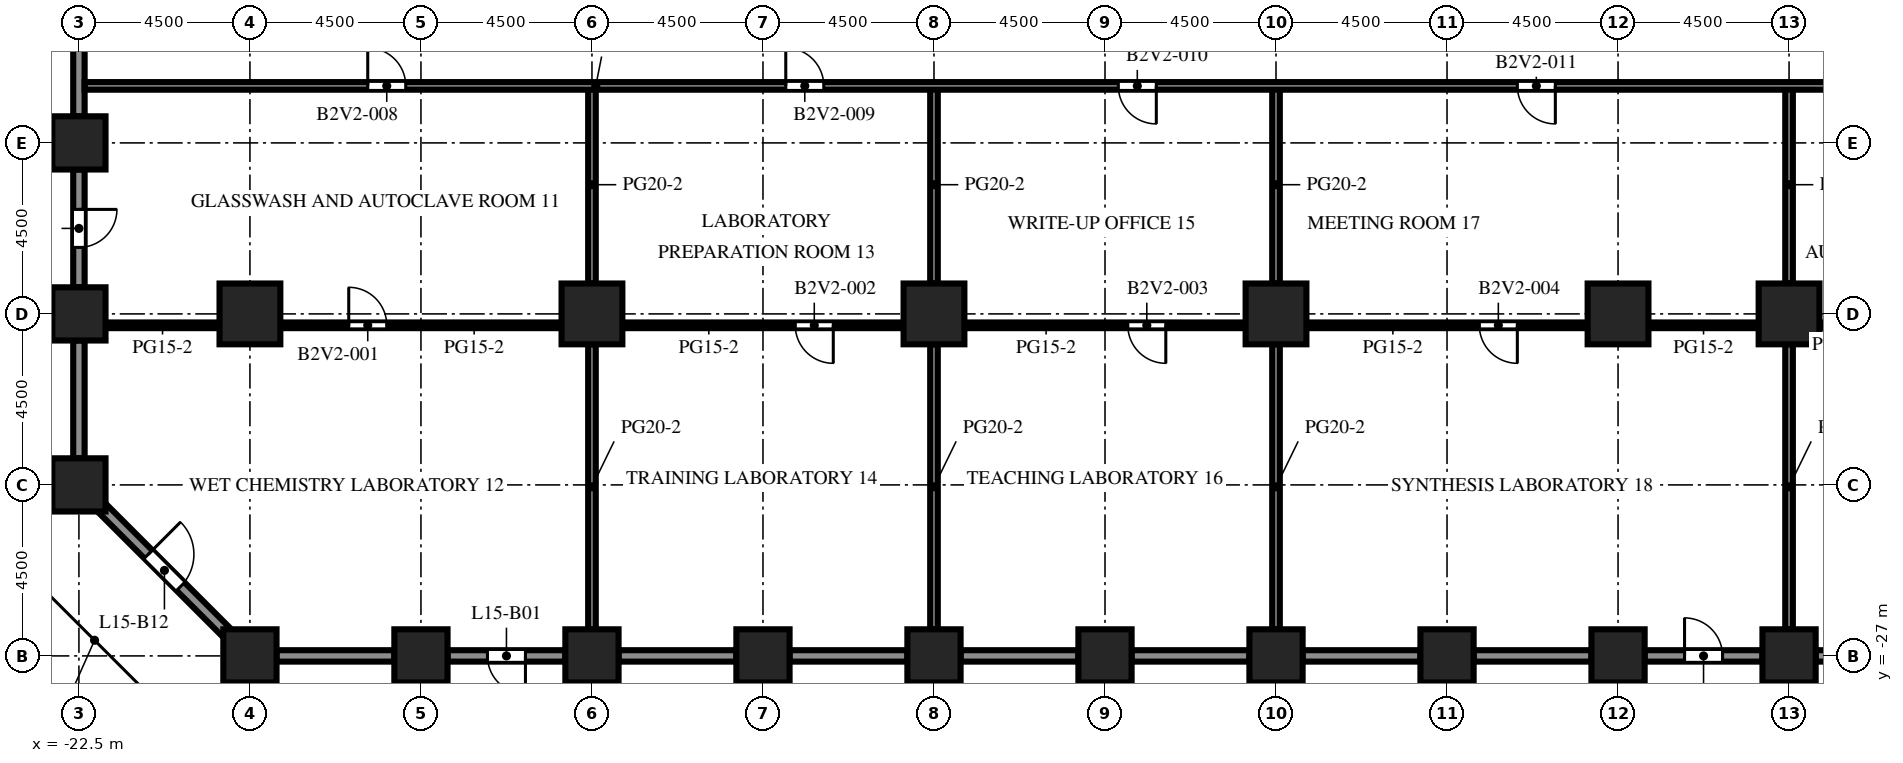
"""IFC4 building model, lengths in metres.
Left out: names, types, materials, properties, quantities, classifications, styles, units other than length and angle.
Written with IfcOpenShell. Run it as: python <this file> out.ifc"""

import sys

from ifc_helpers import new_model, si_unit, direction, frame, frame_2d, origin, origin_2d, place, context, subcontext, project, spatial, rectangle, extrude, element, fill, save


model = new_model("IFC4")
c1 = context("Model", 3, precision=1e-05, world=origin(), true_north=direction((0.0, 1.0)))
c2 = subcontext(c1, "Body", "Model", "MODEL_VIEW")
j1 = project(units=[si_unit("LENGTHUNIT", "METRE"), si_unit("PLANEANGLEUNIT", "RADIAN")], contexts=[c1])
p1 = place(None, origin())
s1 = spatial("IfcSite", under=j1, at=p1, CompositionType="ELEMENT")
p2 = place(p1, origin())
s2 = spatial("IfcBuilding", under=s1, at=p2, CompositionType="ELEMENT")
p3 = place(p2, frame((0.0, 0.0, 66.5)))
s3 = spatial("IfcBuildingStorey", under=s2, at=p3, CompositionType="ELEMENT", Elevation=66.5)
for number, where, z_axis, x_axis in (
    (1, (-22.5, -22.5, 0.0), (0.0, 0.0, 1.0), (1.0, 0.0, 0.0)),
    (2, (-22.5, -18.0, 0.0), (0.0, 0.0, 1.0), (1.0, 0.0, 0.0)),
    (3, (-22.5, -13.5, 0.0), (0.0, 0.0, 1.0), (1.0, 0.0, 0.0)),
    (4, (-18.0, -27.0, 0.0), (0.0, 0.0, 1.0), (1.0, 0.0, 0.0)),
    (5, (-13.5, -27.0, 0.0), (0.0, 0.0, 1.0), (1.0, 0.0, 0.0)),
    (6, (-9.0, -27.0, 0.0), (0.0, 0.0, 1.0), (1.0, 0.0, 0.0)),
    (7, (-4.5, -27.0, 0.0), (0.0, 0.0, 1.0), (1.0, 0.0, 0.0)),
    (8, (0.0, -27.0, 0.0), (0.0, 0.0, 1.0), (1.0, 0.0, 0.0)),
    (9, (4.5, -27.0, 0.0), (0.0, 0.0, 1.0), (1.0, 0.0, 0.0)),
    (10, (9.0, -27.0, 0.0), (0.0, 0.0, 1.0), (1.0, 0.0, 0.0)),
    (11, (13.5, -27.0, 0.0), (0.0, 0.0, 1.0), (1.0, 0.0, 0.0)),
    (12, (18.0, -27.0, 0.0), (0.0, 0.0, 1.0), (1.0, 0.0, 0.0)),
    (13, (22.5, -27.0, 0.0), (0.0, 0.0, 1.0), (1.0, 0.0, 0.0)),
):
    element("IfcColumn", number, at=place(p3, frame(where, z_axis=z_axis, x_axis=x_axis)), inside=s3, PredefinedType="COLUMN", context=c2, shape_type="SweptSolid", body=[
        extrude(rectangle(XDim=1.4, YDim=1.4, at=origin_2d()), origin(), (0.0, 0.0, 1.0), 4.1),
    ])
for number, where, z_axis, x_axis in (
    (14, (-18.0, -18.0, 0.0), (0.0, 0.0, 1.0), (1.0, 0.0, 0.0)),
    (15, (-9.0, -18.0, 0.0), (0.0, 0.0, 1.0), (1.0, 0.0, 0.0)),
    (16, (0.0, -18.0, 0.0), (0.0, 0.0, 1.0), (1.0, 0.0, 0.0)),
    (17, (9.0, -18.0, 0.0), (0.0, 0.0, 1.0), (1.0, 0.0, 0.0)),
    (18, (18.0, -18.0, 0.0), (0.0, 0.0, 1.0), (1.0, 0.0, 0.0)),
    (19, (22.5, -18.0, 0.0), (0.0, 0.0, 1.0), (1.0, 0.0, 0.0)),
):
    element("IfcColumn", number, at=place(p3, frame(where, z_axis=z_axis, x_axis=x_axis)), inside=s3, PredefinedType="COLUMN", context=c2, shape_type="SweptSolid", body=[
        extrude(rectangle(XDim=1.6, YDim=1.6, at=origin_2d()), origin(), (0.0, 0.0, 1.0), 4.1),
    ])
p4 = place(p3, frame((-14.2, -27.0, 0.0), z_axis=(0.0, 0.0, 1.0), x_axis=(-1.0, 0.0, 0.0)))
e20 = element("IfcWall", 20, at=p4, inside=s3, PredefinedType="SOLIDWALL", context=c2, shape_type="SweptSolid", body=[
    extrude(rectangle(XDim=3.1, YDim=0.3, at=frame_2d((1.55, 0.0))), origin(), (0.0, 0.0, 1.0), 2.6),
])
p5 = place(p3, frame((-9.7, -27.0, 0.0), z_axis=(0.0, 0.0, 1.0), x_axis=(-1.0, 0.0, 0.0)))
e21 = element("IfcWall", 21, at=p5, inside=s3, PredefinedType="SOLIDWALL", context=c2, shape_type="SweptSolid", body=[
    extrude(rectangle(XDim=3.1, YDim=0.3, at=frame_2d((1.55, 0.0))), origin(), (0.0, 0.0, 1.0), 2.6),
])
p6 = place(p5, frame((1.05, 0.0, 0.0)))
e22 = element("IfcOpeningElement", 22, at=p6, cuts=e21, PredefinedType="OPENING", context=c2, shape_type="SweptSolid", body=[
    extrude(rectangle(XDim=1.0, YDim=2.2, at=frame_2d((0.5, 1.1))), frame((0.0, 0.16, 0.0), z_axis=(0.0, -1.0, 0.0), x_axis=(1.0, 0.0, 0.0)), (0.0, 0.0, 1.0), 0.32),
])
for number, where, z_axis, x_axis in (
    (23, (-5.2, -27.0, 0.0), (0.0, 0.0, 1.0), (-1.0, 0.0, 0.0)),
    (24, (-0.7, -27.0, 0.0), (0.0, 0.0, 1.0), (-1.0, 0.0, 0.0)),
    (25, (3.8, -27.0, 0.0), (0.0, 0.0, 1.0), (-1.0, 0.0, 0.0)),
    (26, (8.3, -27.0, 0.0), (0.0, 0.0, 1.0), (-1.0, 0.0, 0.0)),
    (27, (12.8, -27.0, 0.0), (0.0, 0.0, 1.0), (-1.0, 0.0, 0.0)),
    (28, (17.3, -27.0, 0.0), (0.0, 0.0, 1.0), (-1.0, 0.0, 0.0)),
):
    element("IfcWall", number, at=place(p3, frame(where, z_axis=z_axis, x_axis=x_axis)), inside=s3, PredefinedType="SOLIDWALL", context=c2, shape_type="SweptSolid", body=[
        extrude(rectangle(XDim=3.1, YDim=0.3, at=frame_2d((1.55, 0.0))), origin(), (0.0, 0.0, 1.0), 2.6),
    ])
p7 = place(p3, frame((21.8, -27.0, 0.0), z_axis=(0.0, 0.0, 1.0), x_axis=(-1.0, 0.0, 0.0)))
e29 = element("IfcWall", 29, at=p7, inside=s3, PredefinedType="SOLIDWALL", context=c2, shape_type="SweptSolid", body=[
    extrude(rectangle(XDim=3.1, YDim=0.3, at=frame_2d((1.55, 0.0))), origin(), (0.0, 0.0, 1.0), 2.6),
])
p8 = place(p7, frame((1.05, 0.0, 0.0)))
e30 = element("IfcOpeningElement", 30, at=p8, cuts=e29, PredefinedType="OPENING", context=c2, shape_type="SweptSolid", body=[
    extrude(rectangle(XDim=1.0, YDim=2.2, at=frame_2d((0.5, 1.1))), frame((0.0, 0.16, 0.0), z_axis=(0.0, -1.0, 0.0), x_axis=(1.0, 0.0, 0.0)), (0.0, 0.0, 1.0), 0.32),
])
for number, where, z_axis, x_axis in (
    (31, (26.3, -27.0, 0.0), (0.0, 0.0, 1.0), (-1.0, 0.0, 0.0)),
    (32, (-22.5, -12.8, 0.0), (0.0, 0.0, 1.0), (0.0, 1.0, 0.0)),
):
    element("IfcWall", number, at=place(p3, frame(where, z_axis=z_axis, x_axis=x_axis)), inside=s3, PredefinedType="SOLIDWALL", context=c2, shape_type="SweptSolid", body=[
        extrude(rectangle(XDim=3.1, YDim=0.3, at=frame_2d((1.55, 0.0))), origin(), (0.0, 0.0, 1.0), 2.6),
    ])
p9 = place(p3, frame((-22.5, -17.3, 0.0), z_axis=(0.0, 0.0, 1.0), x_axis=(0.0, 1.0, 0.0)))
e33 = element("IfcWall", 33, at=p9, inside=s3, PredefinedType="SOLIDWALL", context=c2, shape_type="SweptSolid", body=[
    extrude(rectangle(XDim=3.1, YDim=0.3, at=frame_2d((1.55, 0.0))), origin(), (0.0, 0.0, 1.0), 2.6),
])
p10 = place(p9, frame((1.05, 0.0, 0.0)))
e34 = element("IfcOpeningElement", 34, at=p10, cuts=e33, PredefinedType="OPENING", context=c2, shape_type="SweptSolid", body=[
    extrude(rectangle(XDim=1.0, YDim=2.2, at=frame_2d((0.5, 1.1))), frame((0.0, 0.16, 0.0), z_axis=(0.0, -1.0, 0.0), x_axis=(1.0, 0.0, 0.0)), (0.0, 0.0, 1.0), 0.32),
])
p11 = place(p3, frame((-22.5, -21.8, 0.0), z_axis=(0.0, 0.0, 1.0), x_axis=(0.0, 1.0, 0.0)))
e35 = element("IfcWall", 35, at=p11, inside=s3, PredefinedType="SOLIDWALL", context=c2, shape_type="SweptSolid", body=[
    extrude(rectangle(XDim=3.1, YDim=0.3, at=frame_2d((1.55, 0.0))), origin(), (0.0, 0.0, 1.0), 2.6),
])
p12 = place(p3, frame((-18.594, -26.406, 0.0), z_axis=(0.0, 0.0, 1.0), x_axis=(-0.707106781187, 0.707106781187, 0.0)))
e36 = element("IfcWall", 36, at=p12, inside=s3, PredefinedType="SOLIDWALL", context=c2, shape_type="SweptSolid", body=[
    extrude(rectangle(XDim=4.684, YDim=0.3, at=frame_2d((2.342, 0.0))), origin(), (0.0, 0.0, 1.0), 2.6),
])
p13 = place(p12, frame((1.742, 0.0, 0.0)))
e37 = element("IfcOpeningElement", 37, at=p13, cuts=e36, PredefinedType="OPENING", context=c2, shape_type="SweptSolid", body=[
    extrude(rectangle(XDim=1.2, YDim=2.2, at=frame_2d((0.6, 1.1))), frame((0.0, 0.16, 0.0), z_axis=(0.0, -1.0, 0.0), x_axis=(1.0, 0.0, 0.0)), (0.0, 0.0, 1.0), 0.32),
])
p14 = place(p3, frame((-9.0, -26.3, 0.0), z_axis=(0.0, 0.0, 1.0), x_axis=(0.0, 1.0, 0.0)))
e38 = element("IfcWall", 38, at=p14, inside=s3, PredefinedType="PARTITIONING", context=c2, shape_type="SweptSolid", body=[
    extrude(rectangle(XDim=7.5, YDim=0.2, at=frame_2d((3.75, 0.0))), origin(), (0.0, 0.0, 1.0), 3.5),
])
p15 = place(p3, frame((-9.0, -17.2, 0.0), z_axis=(0.0, 0.0, 1.0), x_axis=(0.0, 1.0, 0.0)))
e39 = element("IfcWall", 39, at=p15, inside=s3, PredefinedType="PARTITIONING", context=c2, shape_type="SweptSolid", body=[
    extrude(rectangle(XDim=5.2, YDim=0.2, at=frame_2d((2.6, 0.0))), origin(), (0.0, 0.0, 1.0), 3.5),
])
p16 = place(p3, frame((0.0, -26.3, 0.0), z_axis=(0.0, 0.0, 1.0), x_axis=(0.0, 1.0, 0.0)))
e40 = element("IfcWall", 40, at=p16, inside=s3, PredefinedType="PARTITIONING", context=c2, shape_type="SweptSolid", body=[
    extrude(rectangle(XDim=7.5, YDim=0.2, at=frame_2d((3.75, 0.0))), origin(), (0.0, 0.0, 1.0), 3.5),
])
p17 = place(p3, frame((0.0, -17.2, 0.0), z_axis=(0.0, 0.0, 1.0), x_axis=(0.0, 1.0, 0.0)))
e41 = element("IfcWall", 41, at=p17, inside=s3, PredefinedType="PARTITIONING", context=c2, shape_type="SweptSolid", body=[
    extrude(rectangle(XDim=5.2, YDim=0.2, at=frame_2d((2.6, 0.0))), origin(), (0.0, 0.0, 1.0), 3.5),
])
p18 = place(p3, frame((9.0, -26.3, 0.0), z_axis=(0.0, 0.0, 1.0), x_axis=(0.0, 1.0, 0.0)))
e42 = element("IfcWall", 42, at=p18, inside=s3, PredefinedType="PARTITIONING", context=c2, shape_type="SweptSolid", body=[
    extrude(rectangle(XDim=7.5, YDim=0.2, at=frame_2d((3.75, 0.0))), origin(), (0.0, 0.0, 1.0), 3.5),
])
p19 = place(p3, frame((9.0, -17.2, 0.0), z_axis=(0.0, 0.0, 1.0), x_axis=(0.0, 1.0, 0.0)))
e43 = element("IfcWall", 43, at=p19, inside=s3, PredefinedType="PARTITIONING", context=c2, shape_type="SweptSolid", body=[
    extrude(rectangle(XDim=5.2, YDim=0.2, at=frame_2d((2.6, 0.0))), origin(), (0.0, 0.0, 1.0), 3.5),
])
p20 = place(p3, frame((22.5, -26.3, 0.0), z_axis=(0.0, 0.0, 1.0), x_axis=(0.0, 1.0, 0.0)))
e44 = element("IfcWall", 44, at=p20, inside=s3, PredefinedType="PARTITIONING", context=c2, shape_type="SweptSolid", body=[
    extrude(rectangle(XDim=7.5, YDim=0.2, at=frame_2d((3.75, 0.0))), origin(), (0.0, 0.0, 1.0), 3.5),
])
p21 = place(p3, frame((22.5, -17.2, 0.0), z_axis=(0.0, 0.0, 1.0), x_axis=(0.0, 1.0, 0.0)))
e45 = element("IfcWall", 45, at=p21, inside=s3, PredefinedType="PARTITIONING", context=c2, shape_type="SweptSolid", body=[
    extrude(rectangle(XDim=5.2, YDim=0.2, at=frame_2d((2.6, 0.0))), origin(), (0.0, 0.0, 1.0), 3.5),
])
p22 = place(p3, frame((-21.8, -18.3, 0.0), z_axis=(0.0, 0.0, 1.0), x_axis=(1.0, 0.0, 0.0)))
e46 = element("IfcWall", 46, at=p22, inside=s3, PredefinedType="PARTITIONING", context=c2, shape_type="SweptSolid", body=[
    extrude(rectangle(XDim=3.0, YDim=0.15, at=frame_2d((1.5, 0.0))), origin(), (0.0, 0.0, 1.0), 3.5),
])
p23 = place(p3, frame((-9.8, -18.3, 0.0), z_axis=(0.0, 0.0, 1.0), x_axis=(-1.0, 0.0, 0.0)))
e47 = element("IfcWall", 47, at=p23, inside=s3, PredefinedType="PARTITIONING", context=c2, shape_type="SweptSolid", body=[
    extrude(rectangle(XDim=7.4, YDim=0.15, at=frame_2d((3.7, 0.0))), origin(), (0.0, 0.0, 1.0), 3.5),
])
p24 = place(p23, frame((4.6, 0.0, 0.0)))
e48 = element("IfcOpeningElement", 48, at=p24, cuts=e47, PredefinedType="OPENING", context=c2, shape_type="SweptSolid", body=[
    extrude(rectangle(XDim=1.0, YDim=2.1, at=frame_2d((0.5, 1.05))), frame((0.0, 0.085, 0.0), z_axis=(0.0, -1.0, 0.0), x_axis=(1.0, 0.0, 0.0)), (0.0, 0.0, 1.0), 0.17),
])
p25 = place(p3, frame((-0.8, -18.3, 0.0), z_axis=(0.0, 0.0, 1.0), x_axis=(-1.0, 0.0, 0.0)))
e49 = element("IfcWall", 49, at=p25, inside=s3, PredefinedType="PARTITIONING", context=c2, shape_type="SweptSolid", body=[
    extrude(rectangle(XDim=7.4, YDim=0.15, at=frame_2d((3.7, 0.0))), origin(), (0.0, 0.0, 1.0), 3.5),
])
p26 = place(p25, frame((1.85, 0.0, 0.0)))
e50 = element("IfcOpeningElement", 50, at=p26, cuts=e49, PredefinedType="OPENING", context=c2, shape_type="SweptSolid", body=[
    extrude(rectangle(XDim=1.0, YDim=2.1, at=frame_2d((0.5, 1.05))), frame((0.0, 0.085, 0.0), z_axis=(0.0, -1.0, 0.0), x_axis=(1.0, 0.0, 0.0)), (0.0, 0.0, 1.0), 0.17),
])
p27 = place(p3, frame((8.2, -18.3, 0.0), z_axis=(0.0, 0.0, 1.0), x_axis=(-1.0, 0.0, 0.0)))
e51 = element("IfcWall", 51, at=p27, inside=s3, PredefinedType="PARTITIONING", context=c2, shape_type="SweptSolid", body=[
    extrude(rectangle(XDim=7.4, YDim=0.15, at=frame_2d((3.7, 0.0))), origin(), (0.0, 0.0, 1.0), 3.5),
])
p28 = place(p27, frame((2.1, 0.0, 0.0)))
e52 = element("IfcOpeningElement", 52, at=p28, cuts=e51, PredefinedType="OPENING", context=c2, shape_type="SweptSolid", body=[
    extrude(rectangle(XDim=1.0, YDim=2.1, at=frame_2d((0.5, 1.05))), frame((0.0, 0.085, 0.0), z_axis=(0.0, -1.0, 0.0), x_axis=(1.0, 0.0, 0.0)), (0.0, 0.0, 1.0), 0.17),
])
p29 = place(p3, frame((17.2, -18.3, 0.0), z_axis=(0.0, 0.0, 1.0), x_axis=(-1.0, 0.0, 0.0)))
e53 = element("IfcWall", 53, at=p29, inside=s3, PredefinedType="PARTITIONING", context=c2, shape_type="SweptSolid", body=[
    extrude(rectangle(XDim=7.4, YDim=0.15, at=frame_2d((3.7, 0.0))), origin(), (0.0, 0.0, 1.0), 3.5),
])
p30 = place(p29, frame((1.85, 0.0, 0.0)))
e54 = element("IfcOpeningElement", 54, at=p30, cuts=e53, PredefinedType="OPENING", context=c2, shape_type="SweptSolid", body=[
    extrude(rectangle(XDim=1.0, YDim=2.1, at=frame_2d((0.5, 1.05))), frame((0.0, 0.085, 0.0), z_axis=(0.0, -1.0, 0.0), x_axis=(1.0, 0.0, 0.0)), (0.0, 0.0, 1.0), 0.17),
])
p31 = place(p3, frame((18.8, -18.3, 0.0), z_axis=(0.0, 0.0, 1.0), x_axis=(1.0, 0.0, 0.0)))
e55 = element("IfcWall", 55, at=p31, inside=s3, PredefinedType="PARTITIONING", context=c2, shape_type="SweptSolid", body=[
    extrude(rectangle(XDim=2.9, YDim=0.15, at=frame_2d((1.45, 0.0))), origin(), (0.0, 0.0, 1.0), 3.5),
])
p32 = place(p3, frame((26.2, -18.3, 0.0), z_axis=(0.0, 0.0, 1.0), x_axis=(-1.0, 0.0, 0.0)))
e56 = element("IfcWall", 56, at=p32, inside=s3, PredefinedType="PARTITIONING", context=c2, shape_type="SweptSolid", body=[
    extrude(rectangle(XDim=2.9, YDim=0.15, at=frame_2d((1.45, 0.0))), origin(), (0.0, 0.0, 1.0), 3.5),
])
p33 = place(p32, frame((0.1, 0.0, 0.0)))
e57 = element("IfcOpeningElement", 57, at=p33, cuts=e56, PredefinedType="OPENING", context=c2, shape_type="SweptSolid", body=[
    extrude(rectangle(XDim=1.0, YDim=2.1, at=frame_2d((0.5, 1.05))), frame((0.0, 0.085, 0.0), z_axis=(0.0, -1.0, 0.0), x_axis=(1.0, 0.0, 0.0)), (0.0, 0.0, 1.0), 0.17),
])
p34 = place(p3, frame((31.35, -12.0, 0.0), z_axis=(0.0, 0.0, 1.0), x_axis=(-1.0, 0.0, 0.0)))
e58 = element("IfcWall", 58, at=p34, inside=s3, PredefinedType="PARTITIONING", context=c2, shape_type="SweptSolid", body=[
    extrude(rectangle(XDim=53.7, YDim=0.2, at=frame_2d((26.85, 0.0))), origin(), (0.0, 0.0, 1.0), 3.5),
])
p35 = place(p34, frame((45.25, 0.0, 0.0)))
e59 = element("IfcOpeningElement", 59, at=p35, cuts=e58, PredefinedType="OPENING", context=c2, shape_type="SweptSolid", body=[
    extrude(rectangle(XDim=1.0, YDim=2.1, at=frame_2d((0.5, 1.05))), frame((0.0, 0.11, 0.0), z_axis=(0.0, -1.0, 0.0), x_axis=(1.0, 0.0, 0.0)), (0.0, 0.0, 1.0), 0.22),
])
p36 = place(p34, frame((34.25, 0.0, 0.0)))
e60 = element("IfcOpeningElement", 60, at=p36, cuts=e58, PredefinedType="OPENING", context=c2, shape_type="SweptSolid", body=[
    extrude(rectangle(XDim=1.0, YDim=2.1, at=frame_2d((0.5, 1.05))), frame((0.0, 0.11, 0.0), z_axis=(0.0, -1.0, 0.0), x_axis=(1.0, 0.0, 0.0)), (0.0, 0.0, 1.0), 0.22),
])
p37 = place(p34, frame((25.5, 0.0, 0.0)))
e61 = element("IfcOpeningElement", 61, at=p37, cuts=e58, PredefinedType="OPENING", context=c2, shape_type="SweptSolid", body=[
    extrude(rectangle(XDim=1.0, YDim=2.1, at=frame_2d((0.5, 1.05))), frame((0.0, 0.11, 0.0), z_axis=(0.0, -1.0, 0.0), x_axis=(1.0, 0.0, 0.0)), (0.0, 0.0, 1.0), 0.22),
])
p38 = place(p34, frame((15.0, 0.0, 0.0)))
e62 = element("IfcOpeningElement", 62, at=p38, cuts=e58, PredefinedType="OPENING", context=c2, shape_type="SweptSolid", body=[
    extrude(rectangle(XDim=1.0, YDim=2.1, at=frame_2d((0.5, 1.05))), frame((0.0, 0.11, 0.0), z_axis=(0.0, -1.0, 0.0), x_axis=(1.0, 0.0, 0.0)), (0.0, 0.0, 1.0), 0.22),
])
p39 = place(p34, frame((5.0, 0.0, 0.0)))
e63 = element("IfcOpeningElement", 63, at=p39, cuts=e58, PredefinedType="OPENING", context=c2, shape_type="SweptSolid", body=[
    extrude(rectangle(XDim=1.0, YDim=2.1, at=frame_2d((0.5, 1.05))), frame((0.0, 0.11, 0.0), z_axis=(0.0, -1.0, 0.0), x_axis=(1.0, 0.0, 0.0)), (0.0, 0.0, 1.0), 0.22),
])
p40 = place(p6, origin())
e64 = element("IfcDoor", 64, at=p40, inside=s3, OperationType="SINGLE_SWING_LEFT", PredefinedType="DOOR", context=c2, shape_type="SweptSolid", body=[
    extrude(rectangle(XDim=1.0, YDim=2.2, at=frame_2d((0.5, 1.1))), frame((0.0, 0.025, 0.0), z_axis=(0.0, -1.0, 0.0), x_axis=(1.0, 0.0, 0.0)), (0.0, 0.0, 1.0), 0.05),
])
fill(e22, e64)
p41 = place(p8, origin())
e65 = element("IfcDoor", 65, at=p41, inside=s3, OperationType="SINGLE_SWING_RIGHT", PredefinedType="DOOR", context=c2, shape_type="SweptSolid", body=[
    extrude(rectangle(XDim=1.0, YDim=2.2, at=frame_2d((0.5, 1.1))), frame((0.0, 0.025, 0.0), z_axis=(0.0, -1.0, 0.0), x_axis=(1.0, 0.0, 0.0)), (0.0, 0.0, 1.0), 0.05),
])
fill(e30, e65)
p42 = place(p10, origin())
e66 = element("IfcDoor", 66, at=p42, inside=s3, OperationType="SINGLE_SWING_RIGHT", PredefinedType="DOOR", context=c2, shape_type="SweptSolid", body=[
    extrude(rectangle(XDim=1.0, YDim=2.2, at=frame_2d((0.5, 1.1))), frame((0.0, 0.025, 0.0), z_axis=(0.0, -1.0, 0.0), x_axis=(1.0, 0.0, 0.0)), (0.0, 0.0, 1.0), 0.05),
])
fill(e34, e66)
p43 = place(p13, origin())
e67 = element("IfcDoor", 67, at=p43, inside=s3, OperationType="SINGLE_SWING_RIGHT", PredefinedType="DOOR", context=c2, shape_type="SweptSolid", body=[
    extrude(rectangle(XDim=1.2, YDim=2.2, at=frame_2d((0.6, 1.1))), frame((0.0, 0.025, 0.0), z_axis=(0.0, -1.0, 0.0), x_axis=(1.0, 0.0, 0.0)), (0.0, 0.0, 1.0), 0.05),
])
fill(e37, e67)
p44 = place(p24, origin())
e68 = element("IfcDoor", 68, at=p44, inside=s3, OperationType="SINGLE_SWING_RIGHT", PredefinedType="DOOR", context=c2, shape_type="SweptSolid", body=[
    extrude(rectangle(XDim=1.0, YDim=2.1, at=frame_2d((0.5, 1.05))), frame((0.0, 0.025, 0.0), z_axis=(0.0, -1.0, 0.0), x_axis=(1.0, 0.0, 0.0)), (0.0, 0.0, 1.0), 0.05),
])
fill(e48, e68)
p45 = place(p26, origin())
e69 = element("IfcDoor", 69, at=p45, inside=s3, OperationType="SINGLE_SWING_LEFT", PredefinedType="DOOR", context=c2, shape_type="SweptSolid", body=[
    extrude(rectangle(XDim=1.0, YDim=2.1, at=frame_2d((0.5, 1.05))), frame((0.0, 0.025, 0.0), z_axis=(0.0, -1.0, 0.0), x_axis=(1.0, 0.0, 0.0)), (0.0, 0.0, 1.0), 0.05),
])
fill(e50, e69)
p46 = place(p28, origin())
e70 = element("IfcDoor", 70, at=p46, inside=s3, OperationType="SINGLE_SWING_LEFT", PredefinedType="DOOR", context=c2, shape_type="SweptSolid", body=[
    extrude(rectangle(XDim=1.0, YDim=2.1, at=frame_2d((0.5, 1.05))), frame((0.0, 0.025, 0.0), z_axis=(0.0, -1.0, 0.0), x_axis=(1.0, 0.0, 0.0)), (0.0, 0.0, 1.0), 0.05),
])
fill(e52, e70)
p47 = place(p30, origin())
e71 = element("IfcDoor", 71, at=p47, inside=s3, OperationType="SINGLE_SWING_LEFT", PredefinedType="DOOR", context=c2, shape_type="SweptSolid", body=[
    extrude(rectangle(XDim=1.0, YDim=2.1, at=frame_2d((0.5, 1.05))), frame((0.0, 0.025, 0.0), z_axis=(0.0, -1.0, 0.0), x_axis=(1.0, 0.0, 0.0)), (0.0, 0.0, 1.0), 0.05),
])
fill(e54, e71)
p48 = place(p35, origin())
e72 = element("IfcDoor", 72, at=p48, inside=s3, OperationType="SINGLE_SWING_RIGHT", PredefinedType="DOOR", context=c2, shape_type="SweptSolid", body=[
    extrude(rectangle(XDim=1.0, YDim=2.1, at=frame_2d((0.5, 1.05))), frame((0.0, 0.025, 0.0), z_axis=(0.0, -1.0, 0.0), x_axis=(1.0, 0.0, 0.0)), (0.0, 0.0, 1.0), 0.05),
])
fill(e59, e72)
p49 = place(p36, origin())
e73 = element("IfcDoor", 73, at=p49, inside=s3, OperationType="SINGLE_SWING_RIGHT", PredefinedType="DOOR", context=c2, shape_type="SweptSolid", body=[
    extrude(rectangle(XDim=1.0, YDim=2.1, at=frame_2d((0.5, 1.05))), frame((0.0, 0.025, 0.0), z_axis=(0.0, -1.0, 0.0), x_axis=(1.0, 0.0, 0.0)), (0.0, 0.0, 1.0), 0.05),
])
fill(e60, e73)
p50 = place(p37, origin())
e74 = element("IfcDoor", 74, at=p50, inside=s3, OperationType="SINGLE_SWING_LEFT", PredefinedType="DOOR", context=c2, shape_type="SweptSolid", body=[
    extrude(rectangle(XDim=1.0, YDim=2.1, at=frame_2d((0.5, 1.05))), frame((0.0, 0.025, 0.0), z_axis=(0.0, -1.0, 0.0), x_axis=(1.0, 0.0, 0.0)), (0.0, 0.0, 1.0), 0.05),
])
fill(e61, e74)
p51 = place(p38, origin())
e75 = element("IfcDoor", 75, at=p51, inside=s3, OperationType="SINGLE_SWING_LEFT", PredefinedType="DOOR", context=c2, shape_type="SweptSolid", body=[
    extrude(rectangle(XDim=1.0, YDim=2.1, at=frame_2d((0.5, 1.05))), frame((0.0, 0.025, 0.0), z_axis=(0.0, -1.0, 0.0), x_axis=(1.0, 0.0, 0.0)), (0.0, 0.0, 1.0), 0.05),
])
fill(e62, e75)
save(model, sys.argv[1])
